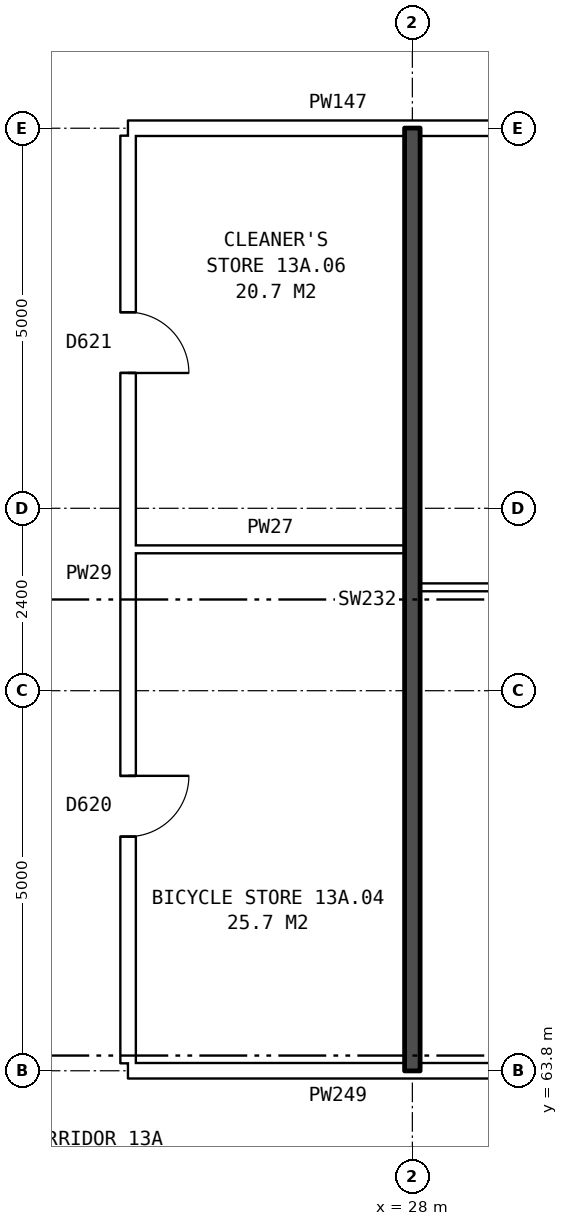
"""IFC4 building model, lengths in metres.
Left out: names, types, materials, properties, quantities, classifications, styles, units other than length and angle.
Written with IfcOpenShell. Run it as: python <this file> out.ifc"""

import sys

from ifc_helpers import new_model, si_unit, direction, frame, frame_2d, origin, place, context, subcontext, project, spatial, rectangle, extrude, element, fill, save


model = new_model("IFC4")
c1 = context("Model", 3, precision=1e-05, world=origin(), true_north=direction((0.0, 1.0)))
c2 = subcontext(c1, "Body", "Model", "MODEL_VIEW")
j1 = project(units=[si_unit("LENGTHUNIT", "METRE"), si_unit("PLANEANGLEUNIT", "RADIAN")], contexts=[c1])
p1 = place(None, origin())
s1 = spatial("IfcSite", under=j1, at=p1, CompositionType="ELEMENT")
p2 = place(p1, origin())
s2 = spatial("IfcBuilding", under=s1, at=p2, CompositionType="ELEMENT")
p3 = place(p2, frame((0.0, 0.0, 50.5)))
s3 = spatial("IfcBuildingStorey", under=s2, at=p3, CompositionType="ELEMENT", Elevation=50.5)
p4 = place(p3, frame((24.26, 63.8, 0.0), z_axis=(0.0, 0.0, 1.0), x_axis=(1.0, 0.0, 0.0)))
e1 = element("IfcWall", 1, at=p4, inside=s3, PredefinedType="PARTITIONING", context=c2, shape_type="SweptSolid", body=[
    extrude(rectangle(XDim=8.1, YDim=0.2, at=frame_2d((4.05, 0.0))), origin(), (0.0, 0.0, 1.0), 2.85),
])
p5 = place(p4, frame((5.52, 0.0, 0.0)))
e2 = element("IfcOpeningElement", 2, at=p5, cuts=e1, PredefinedType="OPENING", context=c2, shape_type="SweptSolid", body=[
    extrude(rectangle(XDim=0.8, YDim=2.1, at=frame_2d((0.4, 1.05))), frame((0.0, 0.11, 0.0), z_axis=(0.0, -1.0, 0.0), x_axis=(1.0, 0.0, 0.0)), (0.0, 0.0, 1.0), 0.22),
])
p6 = place(p3, frame((28.1, 70.16, 0.0), z_axis=(0.0, 0.0, 1.0), x_axis=(1.0, 0.0, 0.0)))
e3 = element("IfcWall", 3, at=p6, inside=s3, PredefinedType="PARTITIONING", context=c2, shape_type="SweptSolid", body=[
    extrude(rectangle(XDim=4.26, YDim=0.1, at=frame_2d((2.13, 0.0))), origin(), (0.0, 0.0, 1.0), 2.85),
])
p7 = place(p3, frame((24.36, 70.66, 0.0), z_axis=(0.0, 0.0, 1.0), x_axis=(1.0, 0.0, 0.0)))
e4 = element("IfcWall", 4, at=p7, inside=s3, PredefinedType="PARTITIONING", context=c2, shape_type="SweptSolid", body=[
    extrude(rectangle(XDim=3.54, YDim=0.1, at=frame_2d((1.77, 0.0))), origin(), (0.0, 0.0, 1.0), 2.85),
])
p8 = place(p3, frame((24.26, 76.2, 0.0), z_axis=(0.0, 0.0, 1.0), x_axis=(1.0, 0.0, 0.0)))
e5 = element("IfcWall", 5, at=p8, inside=s3, PredefinedType="PARTITIONING", context=c2, shape_type="SweptSolid", body=[
    extrude(rectangle(XDim=8.1, YDim=0.2, at=frame_2d((4.05, 0.0))), origin(), (0.0, 0.0, 1.0), 2.85),
])
p9 = place(p8, frame((5.52, 0.0, 0.0)))
e6 = element("IfcOpeningElement", 6, at=p9, cuts=e5, PredefinedType="OPENING", context=c2, shape_type="SweptSolid", body=[
    extrude(rectangle(XDim=0.8, YDim=2.1, at=frame_2d((0.4, 1.05))), frame((0.0, 0.11, 0.0), z_axis=(0.0, -1.0, 0.0), x_axis=(1.0, 0.0, 0.0)), (0.0, 0.0, 1.0), 0.22),
])
p10 = place(p3, frame((24.26, 63.9, 0.0), z_axis=(0.0, 0.0, 1.0), x_axis=(0.0, 1.0, 0.0)))
e7 = element("IfcWall", 7, at=p10, inside=s3, PredefinedType="PARTITIONING", context=c2, shape_type="SweptSolid", body=[
    extrude(rectangle(XDim=12.2, YDim=0.2, at=frame_2d((6.1, 0.0))), origin(), (0.0, 0.0, 1.0), 2.85),
])
p11 = place(p10, frame((2.98, 0.0, 0.0)))
e8 = element("IfcOpeningElement", 8, at=p11, cuts=e7, PredefinedType="OPENING", context=c2, shape_type="SweptSolid", body=[
    extrude(rectangle(XDim=0.8, YDim=2.1, at=frame_2d((0.4, 1.05))), frame((0.0, 0.11, 0.0), z_axis=(0.0, -1.0, 0.0), x_axis=(1.0, 0.0, 0.0)), (0.0, 0.0, 1.0), 0.22),
])
p12 = place(p10, frame((9.08, 0.0, 0.0)))
e9 = element("IfcOpeningElement", 9, at=p12, cuts=e7, PredefinedType="OPENING", context=c2, shape_type="SweptSolid", body=[
    extrude(rectangle(XDim=0.8, YDim=2.1, at=frame_2d((0.4, 1.05))), frame((0.0, 0.11, 0.0), z_axis=(0.0, -1.0, 0.0), x_axis=(1.0, 0.0, 0.0)), (0.0, 0.0, 1.0), 0.22),
])
p13 = place(p3, frame((28.0, 63.8, 0.0), z_axis=(0.0, 0.0, 1.0), x_axis=(0.0, 1.0, 0.0)))
e10 = element("IfcWall", 10, at=p13, inside=s3, PredefinedType="SOLIDWALL", context=c2, shape_type="SweptSolid", body=[
    extrude(rectangle(XDim=12.4, YDim=0.2, at=frame_2d((6.2, 0.0))), origin(), (0.0, 0.0, 1.0), 2.85),
])
p14 = place(p11, frame((0.8, 0.0, 0.0), z_axis=(0.0, 0.0, 1.0), x_axis=(-1.0, 0.0, 0.0)))
e11 = element("IfcDoor", 11, at=p14, inside=s3, OperationType="SINGLE_SWING_LEFT", PredefinedType="DOOR", context=c2, shape_type="SweptSolid", body=[
    extrude(rectangle(XDim=0.8, YDim=2.1, at=frame_2d((0.4, 1.05))), frame((0.0, 0.025, 0.0), z_axis=(0.0, -1.0, 0.0), x_axis=(1.0, 0.0, 0.0)), (0.0, 0.0, 1.0), 0.05),
])
fill(e8, e11)
p15 = place(p12, frame((0.8, 0.0, 0.0), z_axis=(0.0, 0.0, 1.0), x_axis=(-1.0, 0.0, 0.0)))
e12 = element("IfcDoor", 12, at=p15, inside=s3, OperationType="SINGLE_SWING_RIGHT", PredefinedType="DOOR", context=c2, shape_type="SweptSolid", body=[
    extrude(rectangle(XDim=0.8, YDim=2.1, at=frame_2d((0.4, 1.05))), frame((0.0, 0.025, 0.0), z_axis=(0.0, -1.0, 0.0), x_axis=(1.0, 0.0, 0.0)), (0.0, 0.0, 1.0), 0.05),
])
fill(e9, e12)
save(model, sys.argv[1])
